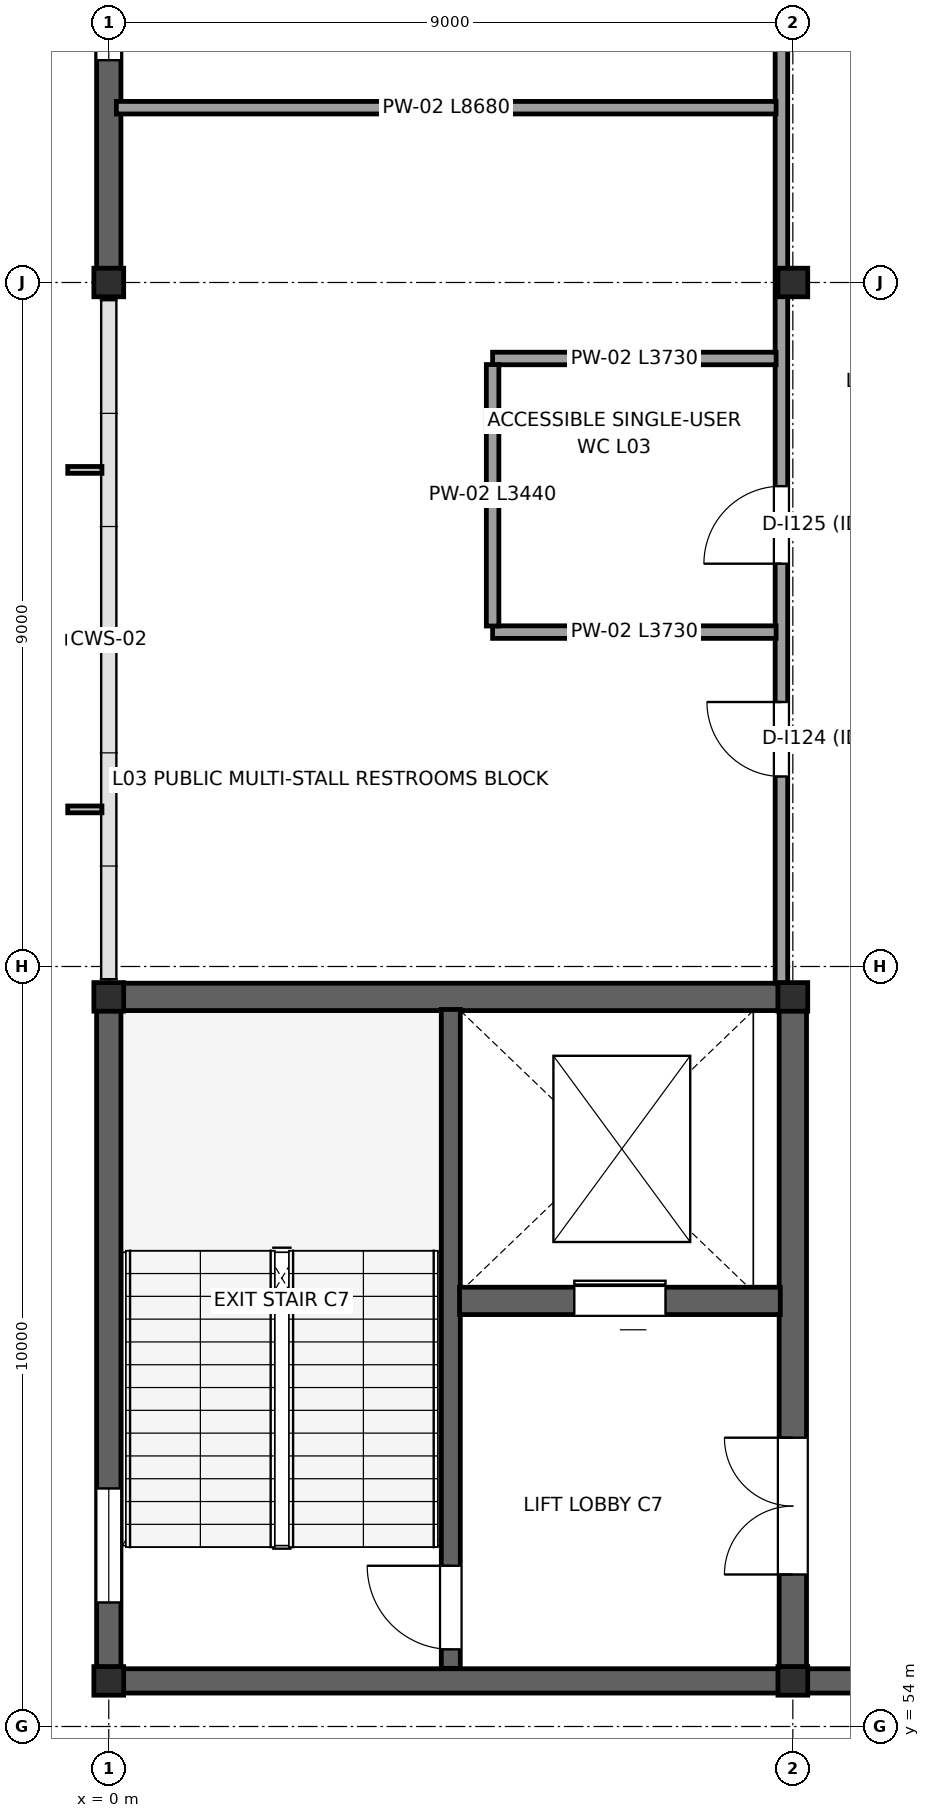
"""IFC4 building model, lengths in metres.
Left out: names, types, materials, properties, quantities, classifications, styles, units other than length and angle.
Written with IfcOpenShell. Run it as: python <this file> out.ifc"""

import sys

from ifc_helpers import new_model, si_unit, direction, frame, frame_2d, origin, origin_2d, place, context, subcontext, project, spatial, rectangle, i_section, extrude, element, fill, save


model = new_model("IFC4")
c1 = context("Model", 3, precision=1e-05, world=origin(), true_north=direction((0.0, 1.0)))
c2 = subcontext(c1, "Body", "Model", "MODEL_VIEW")
j1 = project(units=[si_unit("LENGTHUNIT", "METRE"), si_unit("PLANEANGLEUNIT", "RADIAN")], contexts=[c1])
p1 = place(None, origin())
s1 = spatial("IfcSite", under=j1, at=p1, CompositionType="ELEMENT")
p2 = place(p1, origin())
s2 = spatial("IfcBuilding", under=s1, at=p2, CompositionType="ELEMENT")
p3 = place(p2, frame((0.0, 0.0, 16.5)))
s3 = spatial("IfcBuildingStorey", under=s2, at=p3, CompositionType="ELEMENT", Elevation=16.5)
for number, where, z_axis, x_axis in (
    (1, (0.0, 54.6, 0.0), (0.0, 0.0, 1.0), (1.0, 0.0, 0.0)),
    (2, (0.0, 63.6, 0.0), (0.0, 0.0, 1.0), (1.0, 0.0, 0.0)),
    (3, (0.0, 73.0, 0.0), (0.0, 0.0, 1.0), (1.0, 0.0, 0.0)),
    (4, (9.0, 54.6, 0.0), (0.0, 0.0, 1.0), (1.0, 0.0, 0.0)),
    (5, (9.0, 63.6, 0.0), (0.0, 0.0, 1.0), (1.0, 0.0, 0.0)),
    (6, (9.0, 73.0, 0.0), (0.0, 0.0, 1.0), (1.0, 0.0, 0.0)),
):
    element("IfcColumn", number, at=place(p3, frame(where, z_axis=z_axis, x_axis=x_axis)), inside=s3, PredefinedType="COLUMN", context=c2, shape_type="SweptSolid", body=[
        extrude(i_section(OverallWidth=0.392, OverallDepth=0.376, WebThickness=0.017, FlangeThickness=0.028, at=origin_2d()), origin(), (0.0, 0.0, 1.0), 4.5),
    ])
p4 = place(p3, frame((0.0, 54.782, 0.0), z_axis=(0.0, 0.0, 1.0), x_axis=(0.0, 1.0, 0.0)))
e7 = element("IfcWall", 7, at=p4, inside=s3, PredefinedType="STANDARD", context=c2, shape_type="SweptSolid", body=[
    extrude(rectangle(XDim=8.636, YDim=0.32, at=frame_2d((4.318, 0.0))), origin(), (0.0, 0.0, 1.0), 4.28),
])
p5 = place(p4, frame((0.85, 0.0, 1.1)))
e8 = element("IfcOpeningElement", 8, at=p5, cuts=e7, PredefinedType="OPENING", context=c2, shape_type="SweptSolid", body=[
    extrude(rectangle(XDim=1.5, YDim=1.8, at=frame_2d((0.75, 0.9))), frame((0.0, 0.17, 0.0), z_axis=(0.0, -1.0, 0.0), x_axis=(1.0, 0.0, 0.0)), (0.0, 0.0, 1.0), 0.34),
])
p6 = place(p3, frame((0.0, 73.182, 0.0), z_axis=(0.0, 0.0, 1.0), x_axis=(0.0, 1.0, 0.0)))
e9 = element("IfcWall", 9, at=p6, inside=s3, PredefinedType="STANDARD", context=c2, shape_type="SweptSolid", body=[
    extrude(rectangle(XDim=8.636, YDim=0.32, at=frame_2d((4.318, 0.0))), origin(), (0.0, 0.0, 1.0), 4.28),
])
p7 = place(p6, frame((2.743, 0.0, 1.0)))
e10 = element("IfcOpeningElement", 10, at=p7, cuts=e9, PredefinedType="OPENING", context=c2, shape_type="SweptSolid", body=[
    extrude(rectangle(XDim=3.15, YDim=2.4, at=frame_2d((1.575, 1.2))), frame((0.0, 0.17, 0.0), z_axis=(0.0, -1.0, 0.0), x_axis=(1.0, 0.0, 0.0)), (0.0, 0.0, 1.0), 0.34),
])
for number, where, z_axis, x_axis in (
    (11, (8.985, 54.6, 0.0), (0.0, 0.0, 1.0), (-1.0, 0.0, 0.0)),
    (12, (17.985, 54.6, 0.0), (0.0, 0.0, 1.0), (-1.0, 0.0, 0.0)),
):
    element("IfcWall", number, at=place(p3, frame(where, z_axis=z_axis, x_axis=x_axis)), inside=s3, PredefinedType="STANDARD", context=c2, shape_type="SweptSolid", body=[
        extrude(rectangle(XDim=8.97, YDim=0.32, at=frame_2d((4.485, 0.0))), origin(), (0.0, 0.0, 1.0), 4.28),
    ])
p8 = place(p3, frame((9.0, 54.783, 0.0), z_axis=(0.0, 0.0, 1.0), x_axis=(0.0, 1.0, 0.0)))
e13 = element("IfcWall", 13, at=p8, inside=s3, PredefinedType="SHEAR", context=c2, shape_type="SweptSolid", body=[
    extrude(rectangle(XDim=8.634, YDim=0.36, at=frame_2d((4.317, 0.0))), origin(), (0.0, 0.0, 1.0), 4.28),
])
p9 = place(p8, frame((1.217, 0.0, 0.0)))
e14 = element("IfcOpeningElement", 14, at=p9, cuts=e13, PredefinedType="OPENING", context=c2, shape_type="SweptSolid", body=[
    extrude(rectangle(XDim=1.8, YDim=2.3, at=frame_2d((0.9, 1.15))), frame((0.0, 0.19, 0.0), z_axis=(0.0, -1.0, 0.0), x_axis=(1.0, 0.0, 0.0)), (0.0, 0.0, 1.0), 0.38),
])
p10 = place(p3, frame((0.191, 63.6, 0.0), z_axis=(0.0, 0.0, 1.0), x_axis=(1.0, 0.0, 0.0)))
e15 = element("IfcWall", 15, at=p10, inside=s3, PredefinedType="SHEAR", context=c2, shape_type="SweptSolid", body=[
    extrude(rectangle(XDim=8.618, YDim=0.36, at=frame_2d((4.309, 0.0))), origin(), (0.0, 0.0, 1.0), 4.28),
])
p11 = place(p3, frame((4.5, 54.765, 0.0), z_axis=(0.0, 0.0, 1.0), x_axis=(0.0, 1.0, 0.0)))
e16 = element("IfcWall", 16, at=p11, inside=s3, PredefinedType="SHEAR", context=c2, shape_type="SweptSolid", body=[
    extrude(rectangle(XDim=8.67, YDim=0.25, at=frame_2d((4.335, 0.0))), origin(), (0.0, 0.0, 1.0), 4.28),
])
p12 = place(p11, frame((0.25, 0.0, 0.0)))
e17 = element("IfcOpeningElement", 17, at=p12, cuts=e16, PredefinedType="OPENING", context=c2, shape_type="SweptSolid", body=[
    extrude(rectangle(XDim=1.1, YDim=2.2, at=frame_2d((0.55, 1.1))), frame((0.0, 0.135, 0.0), z_axis=(0.0, -1.0, 0.0), x_axis=(1.0, 0.0, 0.0)), (0.0, 0.0, 1.0), 0.27),
])
p13 = place(p3, frame((4.615, 59.6, 0.0), z_axis=(0.0, 0.0, 1.0), x_axis=(1.0, 0.0, 0.0)))
e18 = element("IfcWall", 18, at=p13, inside=s3, PredefinedType="SHEAR", context=c2, shape_type="SweptSolid", body=[
    extrude(rectangle(XDim=4.22, YDim=0.36, at=frame_2d((2.11, 0.0))), origin(), (0.0, 0.0, 1.0), 4.28),
])
p14 = place(p13, frame((1.51, 0.0, 0.0)))
e19 = element("IfcOpeningElement", 19, at=p14, cuts=e18, PredefinedType="OPENING", context=c2, shape_type="SweptSolid", body=[
    extrude(rectangle(XDim=1.2, YDim=2.3, at=frame_2d((0.6, 1.15))), frame((0.0, 0.19, 0.0), z_axis=(0.0, -1.0, 0.0), x_axis=(1.0, 0.0, 0.0)), (0.0, 0.0, 1.0), 0.38),
])
p15 = place(p3, frame((8.85, 63.78, 0.0), z_axis=(0.0, 0.0, 1.0), x_axis=(0.0, 1.0, 0.0)))
e20 = element("IfcWall", 20, at=p15, inside=s3, PredefinedType="PARTITIONING", context=c2, shape_type="SweptSolid", body=[
    extrude(rectangle(XDim=27.04, YDim=0.165, at=frame_2d((13.52, 0.0))), origin(), (0.0, 0.0, 1.0), 3.5),
])
p16 = place(p15, frame((2.72, 0.0, 0.0)))
e21 = element("IfcOpeningElement", 21, at=p16, cuts=e20, PredefinedType="OPENING", context=c2, shape_type="SweptSolid", body=[
    extrude(rectangle(XDim=0.98, YDim=2.15, at=frame_2d((0.49, 1.075))), frame((0.0, 0.093, 0.0), z_axis=(0.0, -1.0, 0.0), x_axis=(1.0, 0.0, 0.0)), (0.0, 0.0, 1.0), 0.185),
])
p17 = place(p15, frame((5.52, 0.0, 0.0)))
e22 = element("IfcOpeningElement", 22, at=p17, cuts=e20, PredefinedType="OPENING", context=c2, shape_type="SweptSolid", body=[
    extrude(rectangle(XDim=1.02, YDim=2.16, at=frame_2d((0.51, 1.08))), frame((0.0, 0.093, 0.0), z_axis=(0.0, -1.0, 0.0), x_axis=(1.0, 0.0, 0.0)), (0.0, 0.0, 1.0), 0.185),
])
p18 = place(p15, frame((13.72, 0.0, 0.0)))
e23 = element("IfcOpeningElement", 23, at=p18, cuts=e20, PredefinedType="OPENING", context=c2, shape_type="SweptSolid", body=[
    extrude(rectangle(XDim=0.95, YDim=2.12, at=frame_2d((0.475, 1.06))), frame((0.0, 0.093, 0.0), z_axis=(0.0, -1.0, 0.0), x_axis=(1.0, 0.0, 0.0)), (0.0, 0.0, 1.0), 0.185),
])
for number, where, z_axis, x_axis in (
    (24, (5.05, 68.4, 0.0), (0.0, 0.0, 1.0), (1.0, 0.0, 0.0)),
    (25, (5.05, 72.0, 0.0), (0.0, 0.0, 1.0), (1.0, 0.0, 0.0)),
):
    element("IfcWall", number, at=place(p3, frame(where, z_axis=z_axis, x_axis=x_axis)), inside=s3, PredefinedType="PARTITIONING", context=c2, shape_type="SweptSolid", body=[
        extrude(rectangle(XDim=3.73, YDim=0.165, at=frame_2d((1.865, 0.0))), origin(), (0.0, 0.0, 1.0), 3.5),
    ])
p19 = place(p3, frame((5.05, 68.48, 0.0), z_axis=(0.0, 0.0, 1.0), x_axis=(0.0, 1.0, 0.0)))
e26 = element("IfcWall", 26, at=p19, inside=s3, PredefinedType="PARTITIONING", context=c2, shape_type="SweptSolid", body=[
    extrude(rectangle(XDim=3.44, YDim=0.165, at=frame_2d((1.72, 0.0))), origin(), (0.0, 0.0, 1.0), 3.5),
])
p20 = place(p3, frame((0.1, 75.3, 0.0), z_axis=(0.0, 0.0, 1.0), x_axis=(1.0, 0.0, 0.0)))
e27 = element("IfcWall", 27, at=p20, inside=s3, PredefinedType="PARTITIONING", context=c2, shape_type="SweptSolid", body=[
    extrude(rectangle(XDim=8.68, YDim=0.165, at=frame_2d((4.34, 0.0))), origin(), (0.0, 0.0, 1.0), 3.5),
])
p21 = place(p5, origin())
e28 = element("IfcWindow", 28, at=p21, inside=s3, PartitioningType="SINGLE_PANEL", PredefinedType="WINDOW", context=c2, shape_type="SweptSolid", body=[
    extrude(rectangle(XDim=1.5, YDim=1.8, at=frame_2d((0.75, 0.9))), frame((0.0, 0.03, 0.0), z_axis=(0.0, -1.0, 0.0), x_axis=(1.0, 0.0, 0.0)), (0.0, 0.0, 1.0), 0.06),
])
fill(e8, e28)
p22 = place(p7, origin())
e29 = element("IfcWindow", 29, at=p22, inside=s3, PartitioningType="SINGLE_PANEL", PredefinedType="WINDOW", context=c2, shape_type="SweptSolid", body=[
    extrude(rectangle(XDim=3.15, YDim=2.4, at=frame_2d((1.575, 1.2))), frame((0.0, 0.03, 0.0), z_axis=(0.0, -1.0, 0.0), x_axis=(1.0, 0.0, 0.0)), (0.0, 0.0, 1.0), 0.06),
])
fill(e10, e29)
p23 = place(p12, origin())
e30 = element("IfcDoor", 30, at=p23, inside=s3, OperationType="SINGLE_SWING_RIGHT", PredefinedType="DOOR", context=c2, shape_type="SweptSolid", body=[
    extrude(rectangle(XDim=1.1, YDim=2.2, at=frame_2d((0.55, 1.1))), frame((0.0, 0.025, 0.0), z_axis=(0.0, -1.0, 0.0), x_axis=(1.0, 0.0, 0.0)), (0.0, 0.0, 1.0), 0.05),
])
fill(e17, e30)
p24 = place(p14, origin())
e31 = element("IfcDoor", 31, at=p24, inside=s3, OperationType="SLIDING_TO_RIGHT", PredefinedType="DOOR", context=c2, shape_type="SweptSolid", body=[
    extrude(rectangle(XDim=1.2, YDim=2.3, at=frame_2d((0.6, 1.15))), frame((0.0, 0.025, 0.0), z_axis=(0.0, -1.0, 0.0), x_axis=(1.0, 0.0, 0.0)), (0.0, 0.0, 1.0), 0.05),
])
fill(e19, e31)
p25 = place(p9, origin())
e32 = element("IfcDoor", 32, at=p25, inside=s3, OperationType="DOUBLE_DOOR_SINGLE_SWING", PredefinedType="DOOR", context=c2, shape_type="SweptSolid", body=[
    extrude(rectangle(XDim=1.8, YDim=2.3, at=frame_2d((0.9, 1.15))), frame((0.0, 0.025, 0.0), z_axis=(0.0, -1.0, 0.0), x_axis=(1.0, 0.0, 0.0)), (0.0, 0.0, 1.0), 0.05),
])
fill(e14, e32)
p26 = place(p16, origin())
e33 = element("IfcDoor", 33, at=p26, inside=s3, OperationType="SINGLE_SWING_RIGHT", PredefinedType="DOOR", context=c2, shape_type="SweptSolid", body=[
    extrude(rectangle(XDim=0.98, YDim=2.15, at=frame_2d((0.49, 1.075))), frame((0.0, 0.025, 0.0), z_axis=(0.0, -1.0, 0.0), x_axis=(1.0, 0.0, 0.0)), (0.0, 0.0, 1.0), 0.05),
])
fill(e21, e33)
p27 = place(p17, origin())
e34 = element("IfcDoor", 34, at=p27, inside=s3, OperationType="SINGLE_SWING_LEFT", PredefinedType="DOOR", context=c2, shape_type="SweptSolid", body=[
    extrude(rectangle(XDim=1.02, YDim=2.16, at=frame_2d((0.51, 1.08))), frame((0.0, 0.025, 0.0), z_axis=(0.0, -1.0, 0.0), x_axis=(1.0, 0.0, 0.0)), (0.0, 0.0, 1.0), 0.05),
])
fill(e22, e34)
save(model, sys.argv[1])
